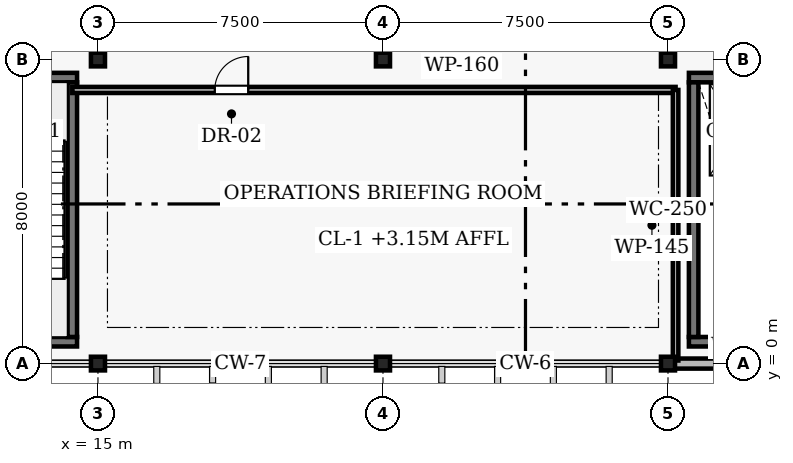
"""IFC4 building model, lengths in metres.
Left out: names, types, materials, properties, quantities, classifications, styles, units other than length and angle.
Written with IfcOpenShell. Run it as: python <this file> out.ifc"""

import sys

from ifc_helpers import new_model, si_unit, direction, frame, frame_2d, origin, origin_2d, place, context, subcontext, project, spatial, rectangle, i_section, extrude, element, fill, save


model = new_model("IFC4")
c1 = context("Model", 3, precision=1e-05, world=origin(), true_north=direction((0.0, 1.0)))
c2 = subcontext(c1, "Body", "Model", "MODEL_VIEW")
j1 = project(units=[si_unit("LENGTHUNIT", "METRE"), si_unit("PLANEANGLEUNIT", "RADIAN")], contexts=[c1])
p1 = place(None, origin())
s1 = spatial("IfcSite", under=j1, at=p1, CompositionType="ELEMENT")
p2 = place(p1, origin())
s2 = spatial("IfcBuilding", under=s1, at=p2, CompositionType="ELEMENT")
p3 = place(p2, frame((0.0, 0.0, 4.5)))
s3 = spatial("IfcBuildingStorey", under=s2, at=p3, CompositionType="ELEMENT", Elevation=4.5)
for number, where, z_axis, x_axis in (
    (1, (15.0, 0.0, 0.0), (0.0, 0.0, 1.0), (1.0, 0.0, 0.0)),
    (2, (15.0, 8.0, 0.0), (0.0, 0.0, 1.0), (1.0, 0.0, 0.0)),
    (3, (22.5, 0.0, 0.0), (0.0, 0.0, 1.0), (1.0, 0.0, 0.0)),
    (4, (22.5, 8.0, 0.0), (0.0, 0.0, 1.0), (1.0, 0.0, 0.0)),
    (5, (30.0, 0.0, 0.0), (0.0, 0.0, 1.0), (1.0, 0.0, 0.0)),
    (6, (30.0, 8.0, 0.0), (0.0, 0.0, 1.0), (1.0, 0.0, 0.0)),
):
    element("IfcColumn", number, at=place(p3, frame(where, z_axis=z_axis, x_axis=x_axis)), inside=s3, PredefinedType="COLUMN", context=c2, shape_type="SweptSolid", body=[
        extrude(i_section(OverallWidth=0.37, OverallDepth=0.36, WebThickness=0.012, FlangeThickness=0.02, FilletRadius=0.015, at=origin_2d()), origin(), (0.0, 0.0, 1.0), 4.28),
    ])
p4 = place(p3, frame((30.08, 0.0, 0.0), z_axis=(0.0, 0.0, 1.0), x_axis=(1.0, 0.0, 0.0)))
e7 = element("IfcWall", 7, at=p4, inside=s3, PredefinedType="SOLIDWALL", context=c2, shape_type="SweptSolid", body=[
    extrude(rectangle(XDim=7.34, YDim=0.265, at=frame_2d((3.67, 0.0))), origin(), (0.0, 0.0, 1.0), 3.85),
])
p5 = place(p4, frame((1.2, 0.0, 1.05)))
e8 = element("IfcOpeningElement", 8, at=p5, cuts=e7, PredefinedType="OPENING", context=c2, shape_type="SweptSolid", body=[
    extrude(rectangle(XDim=1.5, YDim=1.1, at=frame_2d((0.75, 0.55))), frame((0.0, 0.142, 0.0), z_axis=(0.0, -1.0, 0.0), x_axis=(1.0, 0.0, 0.0)), (0.0, 0.0, 1.0), 0.285),
])
p6 = place(p4, frame((4.1, 0.0, 1.05)))
e9 = element("IfcOpeningElement", 9, at=p6, cuts=e7, PredefinedType="OPENING", context=c2, shape_type="SweptSolid", body=[
    extrude(rectangle(XDim=1.5, YDim=1.25, at=frame_2d((0.75, 0.625))), frame((0.0, 0.142, 0.0), z_axis=(0.0, -1.0, 0.0), x_axis=(1.0, 0.0, 0.0)), (0.0, 0.0, 1.0), 0.285),
])
p7 = place(p3, frame((8.05, 0.575, 0.0), z_axis=(0.0, 0.0, 1.0), x_axis=(1.0, 0.0, 0.0)))
e10 = element("IfcWall", 10, at=p7, inside=s3, PredefinedType="SHEAR", context=c2, shape_type="SweptSolid", body=[
    extrude(rectangle(XDim=6.4, YDim=0.25, at=frame_2d((3.2, 0.0))), origin(), (0.0, 0.0, 1.0), 4.5),
])
p8 = place(p3, frame((8.05, 7.525, 0.0), z_axis=(0.0, 0.0, 1.0), x_axis=(1.0, 0.0, 0.0)))
e11 = element("IfcWall", 11, at=p8, inside=s3, PredefinedType="SHEAR", context=c2, shape_type="SweptSolid", body=[
    extrude(rectangle(XDim=6.4, YDim=0.25, at=frame_2d((3.2, 0.0))), origin(), (0.0, 0.0, 1.0), 4.5),
])
p9 = place(p8, frame((0.8, 0.0, 0.0)))
e12 = element("IfcOpeningElement", 12, at=p9, cuts=e11, PredefinedType="OPENING", context=c2, shape_type="SweptSolid", body=[
    extrude(rectangle(XDim=1.1, YDim=2.15, at=frame_2d((0.55, 1.075))), frame((0.0, 0.135, 0.0), z_axis=(0.0, -1.0, 0.0), x_axis=(1.0, 0.0, 0.0)), (0.0, 0.0, 1.0), 0.27),
])
p10 = place(p8, frame((3.775, 0.0, 0.0)))
e13 = element("IfcOpeningElement", 13, at=p10, cuts=e11, PredefinedType="OPENING", context=c2, shape_type="SweptSolid", body=[
    extrude(rectangle(XDim=1.25, YDim=2.15, at=frame_2d((0.625, 1.075))), frame((0.0, 0.135, 0.0), z_axis=(0.0, -1.0, 0.0), x_axis=(1.0, 0.0, 0.0)), (0.0, 0.0, 1.0), 0.27),
])
p11 = place(p3, frame((14.325, 0.7, 0.0), z_axis=(0.0, 0.0, 1.0), x_axis=(0.0, 1.0, 0.0)))
e14 = element("IfcWall", 14, at=p11, inside=s3, PredefinedType="SHEAR", context=c2, shape_type="SweptSolid", body=[
    extrude(rectangle(XDim=6.7, YDim=0.25, at=frame_2d((3.35, 0.0))), origin(), (0.0, 0.0, 1.0), 4.5),
])
p12 = place(p3, frame((30.55, 0.575, 0.0), z_axis=(0.0, 0.0, 1.0), x_axis=(1.0, 0.0, 0.0)))
e15 = element("IfcWall", 15, at=p12, inside=s3, PredefinedType="SHEAR", context=c2, shape_type="SweptSolid", body=[
    extrude(rectangle(XDim=6.4, YDim=0.25, at=frame_2d((3.2, 0.0))), origin(), (0.0, 0.0, 1.0), 4.5),
])
p13 = place(p3, frame((30.55, 7.525, 0.0), z_axis=(0.0, 0.0, 1.0), x_axis=(1.0, 0.0, 0.0)))
e16 = element("IfcWall", 16, at=p13, inside=s3, PredefinedType="SHEAR", context=c2, shape_type="SweptSolid", body=[
    extrude(rectangle(XDim=6.4, YDim=0.25, at=frame_2d((3.2, 0.0))), origin(), (0.0, 0.0, 1.0), 4.5),
])
p14 = place(p13, frame((0.8, 0.0, 0.0)))
e17 = element("IfcOpeningElement", 17, at=p14, cuts=e16, PredefinedType="OPENING", context=c2, shape_type="SweptSolid", body=[
    extrude(rectangle(XDim=1.1, YDim=2.15, at=frame_2d((0.55, 1.075))), frame((0.0, 0.135, 0.0), z_axis=(0.0, -1.0, 0.0), x_axis=(1.0, 0.0, 0.0)), (0.0, 0.0, 1.0), 0.27),
])
p15 = place(p13, frame((3.775, 0.0, 0.0)))
e18 = element("IfcOpeningElement", 18, at=p15, cuts=e16, PredefinedType="OPENING", context=c2, shape_type="SweptSolid", body=[
    extrude(rectangle(XDim=1.25, YDim=2.15, at=frame_2d((0.625, 1.075))), frame((0.0, 0.135, 0.0), z_axis=(0.0, -1.0, 0.0), x_axis=(1.0, 0.0, 0.0)), (0.0, 0.0, 1.0), 0.27),
])
p16 = place(p3, frame((30.675, 0.7, 0.0), z_axis=(0.0, 0.0, 1.0), x_axis=(0.0, 1.0, 0.0)))
e19 = element("IfcWall", 19, at=p16, inside=s3, PredefinedType="SHEAR", context=c2, shape_type="SweptSolid", body=[
    extrude(rectangle(XDim=6.7, YDim=0.25, at=frame_2d((3.35, 0.0))), origin(), (0.0, 0.0, 1.0), 4.5),
])
p17 = place(p3, frame((14.325, 7.2, 0.0), z_axis=(0.0, 0.0, 1.0), x_axis=(1.0, 0.0, 0.0)))
e20 = element("IfcWall", 20, at=p17, inside=s3, PredefinedType="PARTITIONING", context=c2, shape_type="SweptSolid", body=[
    extrude(rectangle(XDim=15.875, YDim=0.16, at=frame_2d((7.938, 0.0))), origin(), (0.0, 0.0, 1.0), 3.7),
])
p18 = place(p17, frame((3.749, 0.0, 0.0)))
e21 = element("IfcOpeningElement", 21, at=p18, cuts=e20, PredefinedType="OPENING", context=c2, shape_type="SweptSolid", body=[
    extrude(rectangle(XDim=0.88, YDim=2.1, at=frame_2d((0.44, 1.05))), frame((0.0, 0.09, 0.0), z_axis=(0.0, -1.0, 0.0), x_axis=(1.0, 0.0, 0.0)), (0.0, 0.0, 1.0), 0.18),
])
p19 = place(p3, frame((30.2, 0.08, 0.0), z_axis=(0.0, 0.0, 1.0), x_axis=(0.0, 1.0, 0.0)))
e22 = element("IfcWall", 22, at=p19, inside=s3, PredefinedType="PARTITIONING", context=c2, shape_type="SweptSolid", body=[
    extrude(rectangle(XDim=7.12, YDim=0.145, at=frame_2d((3.56, 0.0))), origin(), (0.0, 0.0, 1.0), 3.7),
])
p20 = place(p18, origin())
e23 = element("IfcDoor", 23, at=p20, inside=s3, OperationType="SINGLE_SWING_RIGHT", PredefinedType="DOOR", context=c2, shape_type="SweptSolid", body=[
    extrude(rectangle(XDim=0.88, YDim=2.1, at=frame_2d((0.44, 1.05))), frame((0.0, 0.025, 0.0), z_axis=(0.0, -1.0, 0.0), x_axis=(1.0, 0.0, 0.0)), (0.0, 0.0, 1.0), 0.05),
])
fill(e21, e23)
save(model, sys.argv[1])
